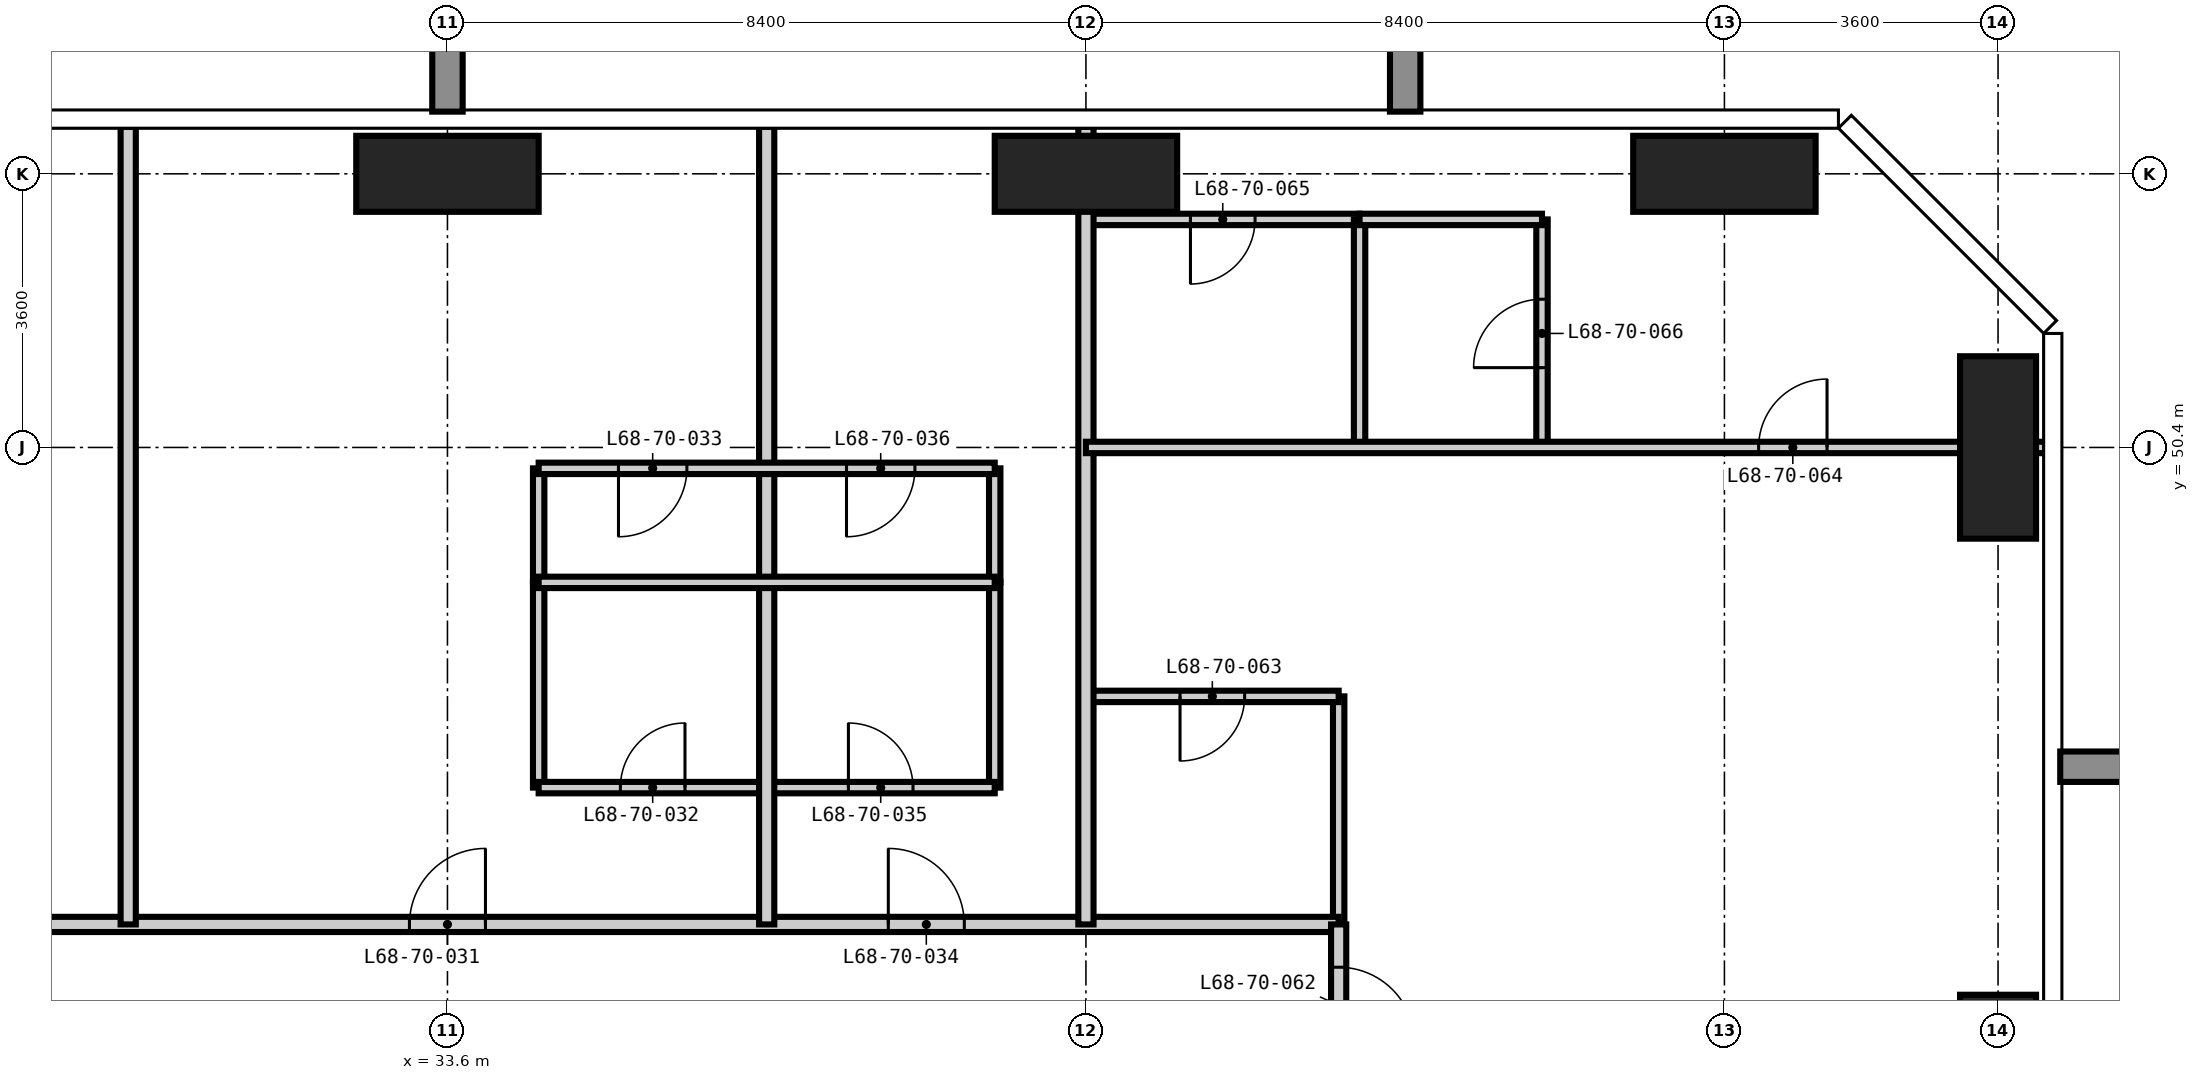
"""IFC4 building model, lengths in metres.
Left out: names, types, materials, properties, quantities, classifications, styles, units other than length and angle.
Written with IfcOpenShell. Run it as: python <this file> out.ifc"""

import sys

from ifc_helpers import new_model, si_unit, direction, frame, frame_2d, origin, origin_2d, place, context, subcontext, project, spatial, rectangle, extrude, element, fill, save


model = new_model("IFC4")
c1 = context("Model", 3, precision=1e-05, world=origin(), true_north=direction((0.0, 1.0)))
c2 = subcontext(c1, "Body", "Model", "MODEL_VIEW")
j1 = project(units=[si_unit("LENGTHUNIT", "METRE"), si_unit("PLANEANGLEUNIT", "RADIAN")], contexts=[c1])
p1 = place(None, origin())
s1 = spatial("IfcSite", under=j1, at=p1, CompositionType="ELEMENT")
p2 = place(p1, origin())
s2 = spatial("IfcBuilding", under=s1, at=p2, CompositionType="ELEMENT")
p3 = place(p2, frame((0.0, 0.0, 264.6)))
s3 = spatial("IfcBuildingStorey", under=s2, at=p3, CompositionType="ELEMENT", Elevation=264.6)
for number, where, z_axis, x_axis in (
    (1, (33.6, 54.0, -0.35), (0.0, 0.0, 1.0), (1.0, 0.0, 0.0)),
    (2, (42.0, 54.0, -0.35), (0.0, 0.0, 1.0), (1.0, 0.0, 0.0)),
    (3, (50.4, 54.0, -0.35), (0.0, 0.0, 1.0), (1.0, 0.0, 0.0)),
):
    element("IfcColumn", number, at=place(p3, frame(where, z_axis=z_axis, x_axis=x_axis)), inside=s3, PredefinedType="COLUMN", context=c2, shape_type="SweptSolid", body=[
        extrude(rectangle(XDim=2.4, YDim=1.0, at=origin_2d()), origin(), (0.0, 0.0, 1.0), 3.9),
    ])
for number, where, z_axis, x_axis in (
    (4, (54.0, 42.0, -0.35), (0.0, 0.0, 1.0), (1.0, 0.0, 0.0)),
    (5, (54.0, 50.4, -0.35), (0.0, 0.0, 1.0), (1.0, 0.0, 0.0)),
):
    element("IfcColumn", number, at=place(p3, frame(where, z_axis=z_axis, x_axis=x_axis)), inside=s3, PredefinedType="COLUMN", context=c2, shape_type="SweptSolid", body=[
        extrude(rectangle(XDim=1.0, YDim=2.4, at=origin_2d()), origin(), (0.0, 0.0, 1.0), 3.9),
    ])
for number, where, z_axis, x_axis in (
    (6, (34.8, 45.925, 0.0), (0.0, 0.0, 1.0), (0.0, 1.0, 0.0)),
    (7, (40.8, 45.925, 0.0), (0.0, 0.0, 1.0), (0.0, 1.0, 0.0)),
):
    element("IfcWall", number, at=place(p3, frame(where, z_axis=z_axis, x_axis=x_axis)), inside=s3, PredefinedType="PARTITIONING", context=c2, shape_type="SweptSolid", body=[
        extrude(rectangle(XDim=2.7, YDim=0.15, at=frame_2d((1.35, 0.0))), origin(), (0.0, 0.0, 1.0), 3.55),
    ])
p4 = place(p3, frame((45.325, 44.125, 0.0), z_axis=(0.0, 0.0, 1.0), x_axis=(0.0, 1.0, 0.0)))
e8 = element("IfcWall", 8, at=p4, inside=s3, PredefinedType="PARTITIONING", context=c2, shape_type="SweptSolid", body=[
    extrude(rectangle(XDim=3.0, YDim=0.15, at=frame_2d((1.5, 0.0))), origin(), (0.0, 0.0, 1.0), 3.55),
])
p5 = place(p3, frame((34.8, 45.925, 0.0), z_axis=(0.0, 0.0, 1.0), x_axis=(1.0, 0.0, 0.0)))
e9 = element("IfcWall", 9, at=p5, inside=s3, PredefinedType="PARTITIONING", context=c2, shape_type="SweptSolid", body=[
    extrude(rectangle(XDim=6.0, YDim=0.15, at=frame_2d((3.0, 0.0))), origin(), (0.0, 0.0, 1.0), 3.55),
])
p6 = place(p5, frame((1.075, 0.0, 0.0)))
e10 = element("IfcOpeningElement", 10, at=p6, cuts=e9, PredefinedType="OPENING", context=c2, shape_type="SweptSolid", body=[
    extrude(rectangle(XDim=0.85, YDim=2.1, at=frame_2d((0.425, 1.05))), frame((0.0, 0.085, 0.0), z_axis=(0.0, -1.0, 0.0), x_axis=(1.0, 0.0, 0.0)), (0.0, 0.0, 1.0), 0.17),
])
p7 = place(p5, frame((4.075, 0.0, 0.0)))
e11 = element("IfcOpeningElement", 11, at=p7, cuts=e9, PredefinedType="OPENING", context=c2, shape_type="SweptSolid", body=[
    extrude(rectangle(XDim=0.85, YDim=2.1, at=frame_2d((0.425, 1.05))), frame((0.0, 0.085, 0.0), z_axis=(0.0, -1.0, 0.0), x_axis=(1.0, 0.0, 0.0)), (0.0, 0.0, 1.0), 0.17),
])
p8 = place(p3, frame((42.0, 47.125, 0.0), z_axis=(0.0, 0.0, 1.0), x_axis=(1.0, 0.0, 0.0)))
e12 = element("IfcWall", 12, at=p8, inside=s3, PredefinedType="PARTITIONING", context=c2, shape_type="SweptSolid", body=[
    extrude(rectangle(XDim=3.325, YDim=0.15, at=frame_2d((1.663, 0.0))), origin(), (0.0, 0.0, 1.0), 3.55),
])
p9 = place(p8, frame((1.238, 0.0, 0.0)))
e13 = element("IfcOpeningElement", 13, at=p9, cuts=e12, PredefinedType="OPENING", context=c2, shape_type="SweptSolid", body=[
    extrude(rectangle(XDim=0.85, YDim=2.1, at=frame_2d((0.425, 1.05))), frame((0.0, 0.085, 0.0), z_axis=(0.0, -1.0, 0.0), x_axis=(1.0, 0.0, 0.0)), (0.0, 0.0, 1.0), 0.17),
])
p10 = place(p3, frame((42.0, 53.4, 0.0), z_axis=(0.0, 0.0, 1.0), x_axis=(1.0, 0.0, 0.0)))
e14 = element("IfcWall", 14, at=p10, inside=s3, PredefinedType="PARTITIONING", context=c2, shape_type="SweptSolid", body=[
    extrude(rectangle(XDim=3.6, YDim=0.15, at=frame_2d((1.8, 0.0))), origin(), (0.0, 0.0, 1.0), 3.55),
])
p11 = place(p10, frame((1.375, 0.0, 0.0)))
e15 = element("IfcOpeningElement", 15, at=p11, cuts=e14, PredefinedType="OPENING", context=c2, shape_type="SweptSolid", body=[
    extrude(rectangle(XDim=0.85, YDim=2.1, at=frame_2d((0.425, 1.05))), frame((0.0, 0.085, 0.0), z_axis=(0.0, -1.0, 0.0), x_axis=(1.0, 0.0, 0.0)), (0.0, 0.0, 1.0), 0.17),
])
p12 = place(p3, frame((22.475, 44.125, 0.0), z_axis=(0.0, 0.0, 1.0), x_axis=(1.0, 0.0, 0.0)))
e16 = element("IfcWall", 16, at=p12, inside=s3, PredefinedType="PARTITIONING", context=c2, shape_type="SweptSolid", body=[
    extrude(rectangle(XDim=22.85, YDim=0.2, at=frame_2d((11.425, 0.0))), origin(), (0.0, 0.0, 1.0), 3.55),
])
p13 = place(p12, frame((4.325, 0.0, 0.0)))
e17 = element("IfcOpeningElement", 17, at=p13, cuts=e16, PredefinedType="OPENING", context=c2, shape_type="SweptSolid", body=[
    extrude(rectangle(XDim=1.0, YDim=2.2, at=frame_2d((0.5, 1.1))), frame((0.0, 0.11, 0.0), z_axis=(0.0, -1.0, 0.0), x_axis=(1.0, 0.0, 0.0)), (0.0, 0.0, 1.0), 0.22),
])
p14 = place(p12, frame((10.625, 0.0, 0.0)))
e18 = element("IfcOpeningElement", 18, at=p14, cuts=e16, PredefinedType="OPENING", context=c2, shape_type="SweptSolid", body=[
    extrude(rectangle(XDim=1.0, YDim=2.2, at=frame_2d((0.5, 1.1))), frame((0.0, 0.11, 0.0), z_axis=(0.0, -1.0, 0.0), x_axis=(1.0, 0.0, 0.0)), (0.0, 0.0, 1.0), 0.22),
])
p15 = place(p12, frame((16.925, 0.0, 0.0)))
e19 = element("IfcOpeningElement", 19, at=p15, cuts=e16, PredefinedType="OPENING", context=c2, shape_type="SweptSolid", body=[
    extrude(rectangle(XDim=1.0, YDim=2.2, at=frame_2d((0.5, 1.1))), frame((0.0, 0.11, 0.0), z_axis=(0.0, -1.0, 0.0), x_axis=(1.0, 0.0, 0.0)), (0.0, 0.0, 1.0), 0.22),
])
p16 = place(p3, frame((45.325, 44.125, 0.0), z_axis=(0.0, 0.0, 1.0), x_axis=(0.0, -1.0, 0.0)))
e20 = element("IfcWall", 20, at=p16, inside=s3, PredefinedType="PARTITIONING", context=c2, shape_type="SweptSolid", body=[
    extrude(rectangle(XDim=6.325, YDim=0.2, at=frame_2d((3.163, 0.0))), origin(), (0.0, 0.0, 1.0), 3.55),
])
p17 = place(p16, frame((3.725, 0.0, 0.0)))
e21 = element("IfcOpeningElement", 21, at=p17, cuts=e20, PredefinedType="OPENING", context=c2, shape_type="SweptSolid", body=[
    extrude(rectangle(XDim=1.0, YDim=2.2, at=frame_2d((0.5, 1.1))), frame((0.0, 0.11, 0.0), z_axis=(0.0, -1.0, 0.0), x_axis=(1.0, 0.0, 0.0)), (0.0, 0.0, 1.0), 0.22),
])
p18 = place(p16, frame((0.563, 0.0, 0.0)))
e22 = element("IfcOpeningElement", 22, at=p18, cuts=e20, PredefinedType="OPENING", context=c2, shape_type="SweptSolid", body=[
    extrude(rectangle(XDim=1.0, YDim=2.2, at=frame_2d((0.5, 1.1))), frame((0.0, 0.11, 0.0), z_axis=(0.0, -1.0, 0.0), x_axis=(1.0, 0.0, 0.0)), (0.0, 0.0, 1.0), 0.22),
])
for number, where, z_axis, x_axis in (
    (23, (29.4, 44.125, 0.0), (0.0, 0.0, 1.0), (0.0, 1.0, 0.0)),
    (24, (37.8, 44.125, 0.0), (0.0, 0.0, 1.0), (0.0, 1.0, 0.0)),
    (25, (42.0, 44.125, 0.0), (0.0, 0.0, 1.0), (0.0, 1.0, 0.0)),
):
    element("IfcWall", number, at=place(p3, frame(where, z_axis=z_axis, x_axis=x_axis)), inside=s3, PredefinedType="PARTITIONING", context=c2, shape_type="SweptSolid", body=[
        extrude(rectangle(XDim=10.493, YDim=0.2, at=frame_2d((5.247, 0.0))), origin(), (0.0, 0.0, 1.0), 3.55),
    ])
for number, where, z_axis, x_axis in (
    (26, (34.8, 48.625, 0.0), (0.0, 0.0, 1.0), (0.0, 1.0, 0.0)),
    (27, (40.8, 48.625, 0.0), (0.0, 0.0, 1.0), (0.0, 1.0, 0.0)),
):
    element("IfcWall", number, at=place(p3, frame(where, z_axis=z_axis, x_axis=x_axis)), inside=s3, PredefinedType="PARTITIONING", context=c2, shape_type="SweptSolid", body=[
        extrude(rectangle(XDim=1.5, YDim=0.15, at=frame_2d((0.75, 0.0))), origin(), (0.0, 0.0, 1.0), 3.55),
    ])
p19 = place(p3, frame((45.6, 50.4, 0.0), z_axis=(0.0, 0.0, 1.0), x_axis=(0.0, 1.0, 0.0)))
e28 = element("IfcWall", 28, at=p19, inside=s3, PredefinedType="PARTITIONING", context=c2, shape_type="SweptSolid", body=[
    extrude(rectangle(XDim=3.0, YDim=0.15, at=frame_2d((1.5, 0.0))), origin(), (0.0, 0.0, 1.0), 3.55),
])
p20 = place(p3, frame((48.0, 50.4, 0.0), z_axis=(0.0, 0.0, 1.0), x_axis=(0.0, 1.0, 0.0)))
e29 = element("IfcWall", 29, at=p20, inside=s3, PredefinedType="PARTITIONING", context=c2, shape_type="SweptSolid", body=[
    extrude(rectangle(XDim=3.0, YDim=0.15, at=frame_2d((1.5, 0.0))), origin(), (0.0, 0.0, 1.0), 3.55),
])
p21 = place(p20, frame((1.05, 0.0, 0.0)))
e30 = element("IfcOpeningElement", 30, at=p21, cuts=e29, PredefinedType="OPENING", context=c2, shape_type="SweptSolid", body=[
    extrude(rectangle(XDim=0.9, YDim=2.1, at=frame_2d((0.45, 1.05))), frame((0.0, 0.085, 0.0), z_axis=(0.0, -1.0, 0.0), x_axis=(1.0, 0.0, 0.0)), (0.0, 0.0, 1.0), 0.17),
])
p22 = place(p3, frame((34.8, 48.625, 0.0), z_axis=(0.0, 0.0, 1.0), x_axis=(1.0, 0.0, 0.0)))
e31 = element("IfcWall", 31, at=p22, inside=s3, PredefinedType="PARTITIONING", context=c2, shape_type="SweptSolid", body=[
    extrude(rectangle(XDim=6.0, YDim=0.15, at=frame_2d((3.0, 0.0))), origin(), (0.0, 0.0, 1.0), 3.55),
])
p23 = place(p3, frame((34.8, 50.125, 0.0), z_axis=(0.0, 0.0, 1.0), x_axis=(1.0, 0.0, 0.0)))
e32 = element("IfcWall", 32, at=p23, inside=s3, PredefinedType="PARTITIONING", context=c2, shape_type="SweptSolid", body=[
    extrude(rectangle(XDim=6.0, YDim=0.15, at=frame_2d((3.0, 0.0))), origin(), (0.0, 0.0, 1.0), 3.55),
])
p24 = place(p23, frame((1.05, 0.0, 0.0)))
e33 = element("IfcOpeningElement", 33, at=p24, cuts=e32, PredefinedType="OPENING", context=c2, shape_type="SweptSolid", body=[
    extrude(rectangle(XDim=0.9, YDim=2.1, at=frame_2d((0.45, 1.05))), frame((0.0, 0.085, 0.0), z_axis=(0.0, -1.0, 0.0), x_axis=(1.0, 0.0, 0.0)), (0.0, 0.0, 1.0), 0.17),
])
p25 = place(p23, frame((4.05, 0.0, 0.0)))
e34 = element("IfcOpeningElement", 34, at=p25, cuts=e32, PredefinedType="OPENING", context=c2, shape_type="SweptSolid", body=[
    extrude(rectangle(XDim=0.9, YDim=2.1, at=frame_2d((0.45, 1.05))), frame((0.0, 0.085, 0.0), z_axis=(0.0, -1.0, 0.0), x_axis=(1.0, 0.0, 0.0)), (0.0, 0.0, 1.0), 0.17),
])
p26 = place(p3, frame((42.0, 50.4, 0.0), z_axis=(0.0, 0.0, 1.0), x_axis=(1.0, 0.0, 0.0)))
e35 = element("IfcWall", 35, at=p26, inside=s3, PredefinedType="PARTITIONING", context=c2, shape_type="SweptSolid", body=[
    extrude(rectangle(XDim=12.618, YDim=0.15, at=frame_2d((6.309, 0.0))), origin(), (0.0, 0.0, 1.0), 3.55),
])
p27 = place(p26, frame((8.85, 0.0, 0.0)))
e36 = element("IfcOpeningElement", 36, at=p27, cuts=e35, PredefinedType="OPENING", context=c2, shape_type="SweptSolid", body=[
    extrude(rectangle(XDim=0.9, YDim=2.1, at=frame_2d((0.45, 1.05))), frame((0.0, 0.085, 0.0), z_axis=(0.0, -1.0, 0.0), x_axis=(1.0, 0.0, 0.0)), (0.0, 0.0, 1.0), 0.17),
])
p28 = place(p3, frame((45.6, 53.4, 0.0), z_axis=(0.0, 0.0, 1.0), x_axis=(1.0, 0.0, 0.0)))
e37 = element("IfcWall", 37, at=p28, inside=s3, PredefinedType="PARTITIONING", context=c2, shape_type="SweptSolid", body=[
    extrude(rectangle(XDim=2.4, YDim=0.15, at=frame_2d((1.2, 0.0))), origin(), (0.0, 0.0, 1.0), 3.55),
])
p29 = place(p14, origin())
e38 = element("IfcDoor", 38, at=p29, inside=s3, OperationType="SINGLE_SWING_RIGHT", PredefinedType="DOOR", context=c2, shape_type="SweptSolid", body=[
    extrude(rectangle(XDim=1.0, YDim=2.2, at=frame_2d((0.5, 1.1))), frame((0.0, 0.025, 0.0), z_axis=(0.0, -1.0, 0.0), x_axis=(1.0, 0.0, 0.0)), (0.0, 0.0, 1.0), 0.05),
])
fill(e18, e38)
p30 = place(p6, origin())
e39 = element("IfcDoor", 39, at=p30, inside=s3, OperationType="SINGLE_SWING_RIGHT", PredefinedType="DOOR", context=c2, shape_type="SweptSolid", body=[
    extrude(rectangle(XDim=0.85, YDim=2.1, at=frame_2d((0.425, 1.05))), frame((0.0, 0.025, 0.0), z_axis=(0.0, -1.0, 0.0), x_axis=(1.0, 0.0, 0.0)), (0.0, 0.0, 1.0), 0.05),
])
fill(e10, e39)
p31 = place(p24, frame((0.9, 0.0, 0.0), z_axis=(0.0, 0.0, 1.0), x_axis=(-1.0, 0.0, 0.0)))
e40 = element("IfcDoor", 40, at=p31, inside=s3, OperationType="SINGLE_SWING_RIGHT", PredefinedType="DOOR", context=c2, shape_type="SweptSolid", body=[
    extrude(rectangle(XDim=0.9, YDim=2.1, at=frame_2d((0.45, 1.05))), frame((0.0, 0.025, 0.0), z_axis=(0.0, -1.0, 0.0), x_axis=(1.0, 0.0, 0.0)), (0.0, 0.0, 1.0), 0.05),
])
fill(e33, e40)
p32 = place(p15, origin())
e41 = element("IfcDoor", 41, at=p32, inside=s3, OperationType="SINGLE_SWING_LEFT", PredefinedType="DOOR", context=c2, shape_type="SweptSolid", body=[
    extrude(rectangle(XDim=1.0, YDim=2.2, at=frame_2d((0.5, 1.1))), frame((0.0, 0.025, 0.0), z_axis=(0.0, -1.0, 0.0), x_axis=(1.0, 0.0, 0.0)), (0.0, 0.0, 1.0), 0.05),
])
fill(e19, e41)
p33 = place(p7, origin())
e42 = element("IfcDoor", 42, at=p33, inside=s3, OperationType="SINGLE_SWING_LEFT", PredefinedType="DOOR", context=c2, shape_type="SweptSolid", body=[
    extrude(rectangle(XDim=0.85, YDim=2.1, at=frame_2d((0.425, 1.05))), frame((0.0, 0.025, 0.0), z_axis=(0.0, -1.0, 0.0), x_axis=(1.0, 0.0, 0.0)), (0.0, 0.0, 1.0), 0.05),
])
fill(e11, e42)
p34 = place(p25, frame((0.9, 0.0, 0.0), z_axis=(0.0, 0.0, 1.0), x_axis=(-1.0, 0.0, 0.0)))
e43 = element("IfcDoor", 43, at=p34, inside=s3, OperationType="SINGLE_SWING_RIGHT", PredefinedType="DOOR", context=c2, shape_type="SweptSolid", body=[
    extrude(rectangle(XDim=0.9, YDim=2.1, at=frame_2d((0.45, 1.05))), frame((0.0, 0.025, 0.0), z_axis=(0.0, -1.0, 0.0), x_axis=(1.0, 0.0, 0.0)), (0.0, 0.0, 1.0), 0.05),
])
fill(e34, e43)
p35 = place(p18, origin())
e44 = element("IfcDoor", 44, at=p35, inside=s3, OperationType="SINGLE_SWING_RIGHT", PredefinedType="DOOR", context=c2, shape_type="SweptSolid", body=[
    extrude(rectangle(XDim=1.0, YDim=2.2, at=frame_2d((0.5, 1.1))), frame((0.0, 0.025, 0.0), z_axis=(0.0, -1.0, 0.0), x_axis=(1.0, 0.0, 0.0)), (0.0, 0.0, 1.0), 0.05),
])
fill(e22, e44)
p36 = place(p9, frame((0.85, 0.0, 0.0), z_axis=(0.0, 0.0, 1.0), x_axis=(-1.0, 0.0, 0.0)))
e45 = element("IfcDoor", 45, at=p36, inside=s3, OperationType="SINGLE_SWING_RIGHT", PredefinedType="DOOR", context=c2, shape_type="SweptSolid", body=[
    extrude(rectangle(XDim=0.85, YDim=2.1, at=frame_2d((0.425, 1.05))), frame((0.0, 0.025, 0.0), z_axis=(0.0, -1.0, 0.0), x_axis=(1.0, 0.0, 0.0)), (0.0, 0.0, 1.0), 0.05),
])
fill(e13, e45)
p37 = place(p27, origin())
e46 = element("IfcDoor", 46, at=p37, inside=s3, OperationType="SINGLE_SWING_RIGHT", PredefinedType="DOOR", context=c2, shape_type="SweptSolid", body=[
    extrude(rectangle(XDim=0.9, YDim=2.1, at=frame_2d((0.45, 1.05))), frame((0.0, 0.025, 0.0), z_axis=(0.0, -1.0, 0.0), x_axis=(1.0, 0.0, 0.0)), (0.0, 0.0, 1.0), 0.05),
])
fill(e36, e46)
p38 = place(p11, frame((0.85, 0.0, 0.0), z_axis=(0.0, 0.0, 1.0), x_axis=(-1.0, 0.0, 0.0)))
e47 = element("IfcDoor", 47, at=p38, inside=s3, OperationType="SINGLE_SWING_RIGHT", PredefinedType="DOOR", context=c2, shape_type="SweptSolid", body=[
    extrude(rectangle(XDim=0.85, YDim=2.1, at=frame_2d((0.425, 1.05))), frame((0.0, 0.025, 0.0), z_axis=(0.0, -1.0, 0.0), x_axis=(1.0, 0.0, 0.0)), (0.0, 0.0, 1.0), 0.05),
])
fill(e15, e47)
p39 = place(p21, origin())
e48 = element("IfcDoor", 48, at=p39, inside=s3, OperationType="SINGLE_SWING_LEFT", PredefinedType="DOOR", context=c2, shape_type="SweptSolid", body=[
    extrude(rectangle(XDim=0.9, YDim=2.1, at=frame_2d((0.45, 1.05))), frame((0.0, 0.025, 0.0), z_axis=(0.0, -1.0, 0.0), x_axis=(1.0, 0.0, 0.0)), (0.0, 0.0, 1.0), 0.05),
])
fill(e30, e48)
save(model, sys.argv[1])
